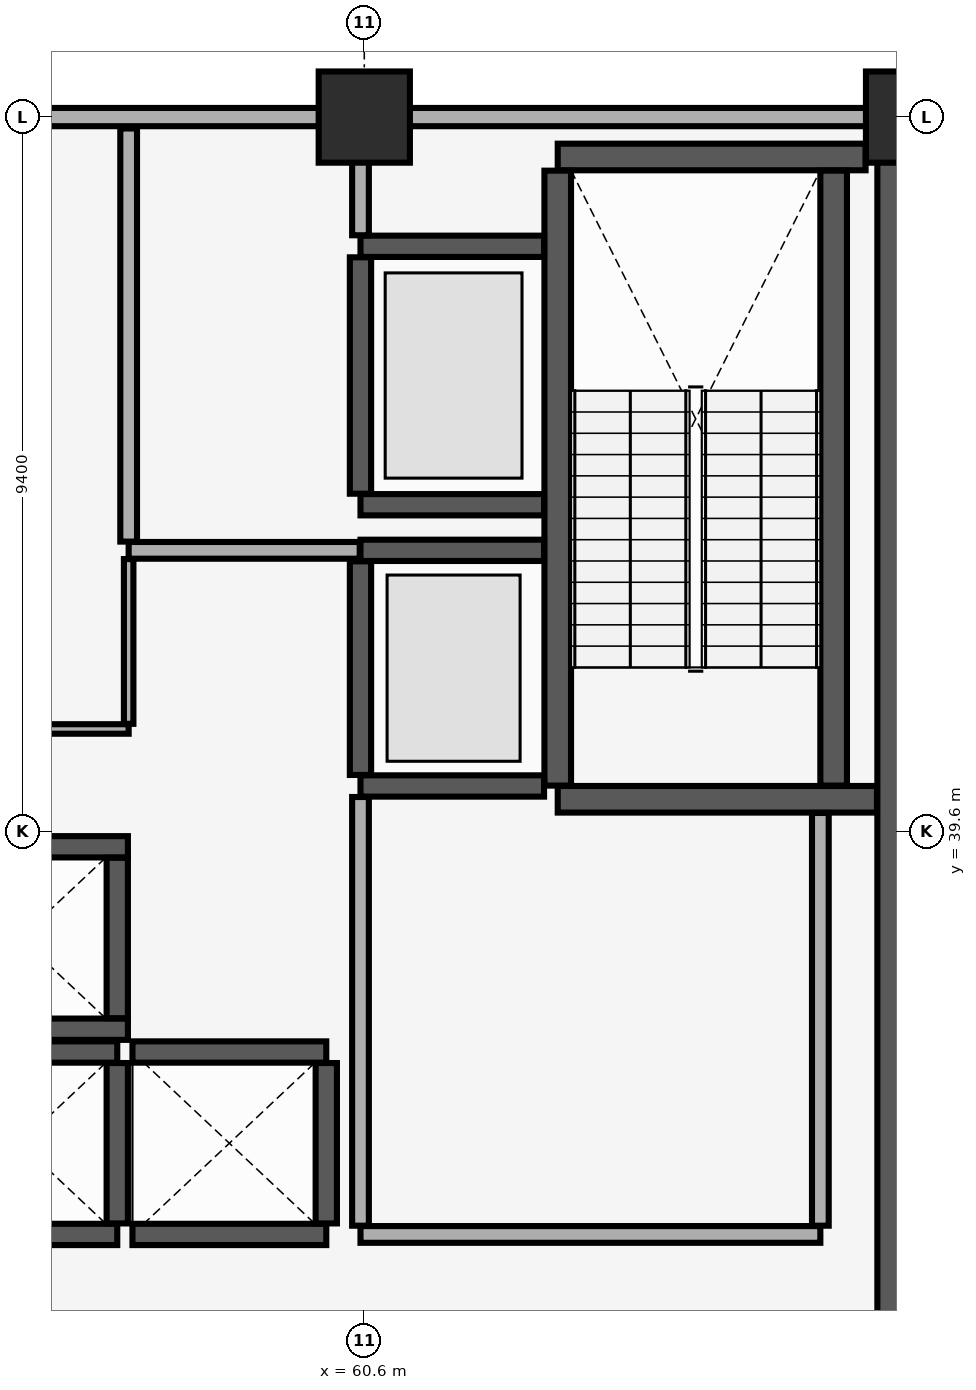
"""IFC4 building model, lengths in metres.
Left out: names, types, materials, properties, quantities, classifications, styles, units other than length and angle.
Written with IfcOpenShell. Run it as: python <this file> out.ifc"""

import sys

from ifc_helpers import new_model, si_unit, direction, frame, frame_2d, origin, origin_2d, place, context, subcontext, project, spatial, rectangle, extrude, element, fill, save


model = new_model("IFC4")
c1 = context("Model", 3, precision=1e-05, world=origin(), true_north=direction((0.0, 1.0)))
c2 = subcontext(c1, "Body", "Model", "MODEL_VIEW")
j1 = project(units=[si_unit("LENGTHUNIT", "METRE"), si_unit("PLANEANGLEUNIT", "RADIAN")], contexts=[c1])
p1 = place(None, origin())
s1 = spatial("IfcSite", under=j1, at=p1, CompositionType="ELEMENT")
p2 = place(p1, origin())
s2 = spatial("IfcBuilding", under=s1, at=p2, CompositionType="ELEMENT")
p3 = place(p2, frame((0.0, 0.0, 224.35)))
s3 = spatial("IfcBuildingStorey", under=s2, at=p3, CompositionType="ELEMENT", Elevation=224.35)
for number, where, z_axis, x_axis in (
    (1, (60.6, 49.0, 0.0), (0.0, 0.0, 1.0), (1.0, 0.0, 0.0)),
    (2, (67.8, 49.0, 0.0), (0.0, 0.0, 1.0), (1.0, 0.0, 0.0)),
):
    element("IfcColumn", number, at=place(p3, frame(where, z_axis=z_axis, x_axis=x_axis)), inside=s3, PredefinedType="COLUMN", context=c2, shape_type="SweptSolid", body=[
        extrude(rectangle(XDim=1.2, YDim=1.2, at=origin_2d()), origin(), (0.0, 0.0, 1.0), 4.56),
    ])
p4 = place(p3, frame((77.0, 49.0, 0.0), z_axis=(0.0, 0.0, 1.0), x_axis=(-1.0, 0.0, 0.0)))
e3 = element("IfcWall", 3, at=p4, inside=s3, PredefinedType="SOLIDWALL", context=c2, shape_type="SweptSolid", body=[
    extrude(rectangle(XDim=70.0, YDim=0.24, at=frame_2d((35.0, 0.0))), origin(), (0.0, 0.0, 1.0), 3.4),
])
p5 = place(p4, frame((62.975, 0.0, 0.85)))
e4 = element("IfcOpeningElement", 4, at=p5, cuts=e3, PredefinedType="OPENING", context=c2, shape_type="SweptSolid", body=[
    extrude(rectangle(XDim=3.0, YDim=1.5, at=frame_2d((1.5, 0.75))), frame((0.0, 0.13, 0.0), z_axis=(0.0, -1.0, 0.0), x_axis=(1.0, 0.0, 0.0)), (0.0, 0.0, 1.0), 0.26),
])
p6 = place(p4, frame((4.025, 0.0, 0.85)))
e5 = element("IfcOpeningElement", 5, at=p6, cuts=e3, PredefinedType="OPENING", context=c2, shape_type="SweptSolid", body=[
    extrude(rectangle(XDim=3.0, YDim=1.5, at=frame_2d((1.5, 0.75))), frame((0.0, 0.13, 0.0), z_axis=(0.0, -1.0, 0.0), x_axis=(1.0, 0.0, 0.0)), (0.0, 0.0, 1.0), 0.26),
])
p7 = place(p4, frame((49.465, 0.0, 0.9)))
e6 = element("IfcOpeningElement", 6, at=p7, cuts=e3, PredefinedType="OPENING", context=c2, shape_type="SweptSolid", body=[
    extrude(rectangle(XDim=1.5, YDim=1.4, at=frame_2d((0.75, 0.7))), frame((0.0, 0.13, 0.0), z_axis=(0.0, -1.0, 0.0), x_axis=(1.0, 0.0, 0.0)), (0.0, 0.0, 1.0), 0.26),
])
p8 = place(p4, frame((41.65, 0.0, 0.9)))
e7 = element("IfcOpeningElement", 7, at=p8, cuts=e3, PredefinedType="OPENING", context=c2, shape_type="SweptSolid", body=[
    extrude(rectangle(XDim=3.6, YDim=1.5, at=frame_2d((1.8, 0.75))), frame((0.0, 0.13, 0.0), z_axis=(0.0, -1.0, 0.0), x_axis=(1.0, 0.0, 0.0)), (0.0, 0.0, 1.0), 0.26),
])
p9 = place(p4, frame((28.25, 0.0, 0.9)))
e8 = element("IfcOpeningElement", 8, at=p9, cuts=e3, PredefinedType="OPENING", context=c2, shape_type="SweptSolid", body=[
    extrude(rectangle(XDim=1.5, YDim=1.4, at=frame_2d((0.75, 0.7))), frame((0.0, 0.13, 0.0), z_axis=(0.0, -1.0, 0.0), x_axis=(1.0, 0.0, 0.0)), (0.0, 0.0, 1.0), 0.26),
])
p10 = place(p4, frame((24.6, 0.0, 0.9)))
e9 = element("IfcOpeningElement", 9, at=p10, cuts=e3, PredefinedType="OPENING", context=c2, shape_type="SweptSolid", body=[
    extrude(rectangle(XDim=2.4, YDim=1.5, at=frame_2d((1.2, 0.75))), frame((0.0, 0.13, 0.0), z_axis=(0.0, -1.0, 0.0), x_axis=(1.0, 0.0, 0.0)), (0.0, 0.0, 1.0), 0.26),
])
p11 = place(p4, frame((20.235, 0.0, 0.9)))
e10 = element("IfcOpeningElement", 10, at=p11, cuts=e3, PredefinedType="OPENING", context=c2, shape_type="SweptSolid", body=[
    extrude(rectangle(XDim=2.4, YDim=1.5, at=frame_2d((1.2, 0.75))), frame((0.0, 0.13, 0.0), z_axis=(0.0, -1.0, 0.0), x_axis=(1.0, 0.0, 0.0)), (0.0, 0.0, 1.0), 0.26),
])
p12 = place(p3, frame((67.8, 29.4, 0.0), z_axis=(0.0, 0.0, 1.0), x_axis=(0.0, 1.0, 0.0)))
e11 = element("IfcWall", 11, at=p12, inside=s3, PredefinedType="SHEAR", context=c2, shape_type="SweptSolid", body=[
    extrude(rectangle(XDim=19.2, YDim=0.9, at=frame_2d((9.6, 0.0))), origin(), (0.0, 0.0, 1.0), 4.52),
])
p13 = place(p3, frame((63.145, 40.025, 0.0), z_axis=(0.0, 0.0, 1.0), x_axis=(1.0, 0.0, 0.0)))
e12 = element("IfcWall", 12, at=p13, inside=s3, PredefinedType="SHEAR", context=c2, shape_type="SweptSolid", body=[
    extrude(rectangle(XDim=4.2, YDim=0.35, at=frame_2d((2.1, 0.0))), origin(), (0.0, 0.0, 1.0), 4.52),
])
p14 = place(p13, frame((1.24, 0.0, 0.0)))
e13 = element("IfcOpeningElement", 13, at=p14, cuts=e12, PredefinedType="OPENING", context=c2, shape_type="SweptSolid", body=[
    extrude(rectangle(XDim=1.15, YDim=2.15, at=frame_2d((0.575, 1.075))), frame((0.0, 0.185, 0.0), z_axis=(0.0, -1.0, 0.0), x_axis=(1.0, 0.0, 0.0)), (0.0, 0.0, 1.0), 0.37),
])
p15 = place(p3, frame((63.145, 48.475, 0.0), z_axis=(0.0, 0.0, 1.0), x_axis=(1.0, 0.0, 0.0)))
e14 = element("IfcWall", 14, at=p15, inside=s3, PredefinedType="SHEAR", context=c2, shape_type="SweptSolid", body=[
    extrude(rectangle(XDim=4.05, YDim=0.35, at=frame_2d((2.025, 0.0))), origin(), (0.0, 0.0, 1.0), 4.52),
])
for number, where, z_axis, x_axis in (
    (15, (63.145, 40.205, 0.0), (0.0, 0.0, 1.0), (0.0, 1.0, 0.0)),
    (16, (66.775, 40.205, 0.0), (0.0, 0.0, 1.0), (0.0, 1.0, 0.0)),
):
    element("IfcWall", number, at=place(p3, frame(where, z_axis=z_axis, x_axis=x_axis)), inside=s3, PredefinedType="SHEAR", context=c2, shape_type="SweptSolid", body=[
        extrude(rectangle(XDim=8.09, YDim=0.35, at=frame_2d((4.045, 0.0))), origin(), (0.0, 0.0, 1.0), 4.52),
    ])
for number, where, z_axis, x_axis in (
    (17, (54.8, 34.3, 0.0), (0.0, 0.0, 1.0), (1.0, 0.0, 0.0)),
    (18, (54.8, 36.7, 0.0), (0.0, 0.0, 1.0), (1.0, 0.0, 0.0)),
):
    element("IfcWall", number, at=place(p3, frame(where, z_axis=z_axis, x_axis=x_axis)), inside=s3, PredefinedType="SHEAR", context=c2, shape_type="SweptSolid", body=[
        extrude(rectangle(XDim=2.55, YDim=0.28, at=frame_2d((1.275, 0.0))), origin(), (0.0, 0.0, 1.0), 4.52),
    ])
p16 = place(p3, frame((57.35, 34.445, 0.0), z_axis=(0.0, 0.0, 1.0), x_axis=(0.0, 1.0, 0.0)))
e19 = element("IfcWall", 19, at=p16, inside=s3, PredefinedType="SHEAR", context=c2, shape_type="SweptSolid", body=[
    extrude(rectangle(XDim=2.11, YDim=0.28, at=frame_2d((1.055, 0.0))), origin(), (0.0, 0.0, 1.0), 4.52),
])
for number, where, z_axis, x_axis in (
    (20, (57.55, 34.3, 0.0), (0.0, 0.0, 1.0), (1.0, 0.0, 0.0)),
    (21, (57.55, 36.7, 0.0), (0.0, 0.0, 1.0), (1.0, 0.0, 0.0)),
):
    element("IfcWall", number, at=place(p3, frame(where, z_axis=z_axis, x_axis=x_axis)), inside=s3, PredefinedType="SHEAR", context=c2, shape_type="SweptSolid", body=[
        extrude(rectangle(XDim=2.55, YDim=0.28, at=frame_2d((1.275, 0.0))), origin(), (0.0, 0.0, 1.0), 4.52),
    ])
p17 = place(p3, frame((60.1, 34.445, 0.0), z_axis=(0.0, 0.0, 1.0), x_axis=(0.0, 1.0, 0.0)))
e22 = element("IfcWall", 22, at=p17, inside=s3, PredefinedType="SHEAR", context=c2, shape_type="SweptSolid", body=[
    extrude(rectangle(XDim=2.11, YDim=0.28, at=frame_2d((1.055, 0.0))), origin(), (0.0, 0.0, 1.0), 4.52),
])
for number, where, z_axis, x_axis in (
    (23, (54.66, 37.0, 0.0), (0.0, 0.0, 1.0), (1.0, 0.0, 0.0)),
    (24, (54.66, 39.4, 0.0), (0.0, 0.0, 1.0), (1.0, 0.0, 0.0)),
):
    element("IfcWall", number, at=place(p3, frame(where, z_axis=z_axis, x_axis=x_axis)), inside=s3, PredefinedType="SHEAR", context=c2, shape_type="SweptSolid", body=[
        extrude(rectangle(XDim=2.83, YDim=0.28, at=frame_2d((1.415, 0.0))), origin(), (0.0, 0.0, 1.0), 4.52),
    ])
p18 = place(p3, frame((57.35, 37.145, 0.0), z_axis=(0.0, 0.0, 1.0), x_axis=(0.0, 1.0, 0.0)))
e25 = element("IfcWall", 25, at=p18, inside=s3, PredefinedType="SHEAR", context=c2, shape_type="SweptSolid", body=[
    extrude(rectangle(XDim=2.11, YDim=0.28, at=frame_2d((1.055, 0.0))), origin(), (0.0, 0.0, 1.0), 4.52),
])
p19 = place(p3, frame((60.55, 40.2, 0.0), z_axis=(0.0, 0.0, 1.0), x_axis=(1.0, 0.0, 0.0)))
e26 = element("IfcWall", 26, at=p19, inside=s3, PredefinedType="SHEAR", context=c2, shape_type="SweptSolid", body=[
    extrude(rectangle(XDim=2.415, YDim=0.28, at=frame_2d((1.208, 0.0))), origin(), (0.0, 0.0, 1.0), 4.52),
])
p20 = place(p19, frame((0.575, 0.0, 0.0)))
e27 = element("IfcOpeningElement", 27, at=p20, cuts=e26, PredefinedType="OPENING", context=c2, shape_type="SweptSolid", body=[
    extrude(rectangle(XDim=1.3, YDim=2.3, at=frame_2d((0.65, 1.15))), frame((0.0, 0.15, 0.0), z_axis=(0.0, -1.0, 0.0), x_axis=(1.0, 0.0, 0.0)), (0.0, 0.0, 1.0), 0.3),
])
p21 = place(p3, frame((60.55, 43.3, 0.0), z_axis=(0.0, 0.0, 1.0), x_axis=(1.0, 0.0, 0.0)))
e28 = element("IfcWall", 28, at=p21, inside=s3, PredefinedType="SHEAR", context=c2, shape_type="SweptSolid", body=[
    extrude(rectangle(XDim=2.415, YDim=0.28, at=frame_2d((1.208, 0.0))), origin(), (0.0, 0.0, 1.0), 4.52),
])
p22 = place(p3, frame((60.55, 40.345, 0.0), z_axis=(0.0, 0.0, 1.0), x_axis=(0.0, 1.0, 0.0)))
e29 = element("IfcWall", 29, at=p22, inside=s3, PredefinedType="SHEAR", context=c2, shape_type="SweptSolid", body=[
    extrude(rectangle(XDim=2.81, YDim=0.28, at=frame_2d((1.405, 0.0))), origin(), (0.0, 0.0, 1.0), 4.52),
])
for number, where, z_axis, x_axis in (
    (30, (60.55, 43.9, 0.0), (0.0, 0.0, 1.0), (1.0, 0.0, 0.0)),
    (31, (60.55, 47.3, 0.0), (0.0, 0.0, 1.0), (1.0, 0.0, 0.0)),
):
    element("IfcWall", number, at=place(p3, frame(where, z_axis=z_axis, x_axis=x_axis)), inside=s3, PredefinedType="SHEAR", context=c2, shape_type="SweptSolid", body=[
        extrude(rectangle(XDim=2.415, YDim=0.28, at=frame_2d((1.208, 0.0))), origin(), (0.0, 0.0, 1.0), 4.52),
    ])
p23 = place(p3, frame((60.55, 44.045, 0.0), z_axis=(0.0, 0.0, 1.0), x_axis=(0.0, 1.0, 0.0)))
e32 = element("IfcWall", 32, at=p23, inside=s3, PredefinedType="SHEAR", context=c2, shape_type="SweptSolid", body=[
    extrude(rectangle(XDim=3.11, YDim=0.28, at=frame_2d((1.555, 0.0))), origin(), (0.0, 0.0, 1.0), 4.52),
])
p24 = place(p23, frame((0.905, 0.0, 0.0)))
e33 = element("IfcOpeningElement", 33, at=p24, cuts=e32, PredefinedType="OPENING", context=c2, shape_type="SweptSolid", body=[
    extrude(rectangle(XDim=1.3, YDim=2.3, at=frame_2d((0.65, 1.15))), frame((0.0, 0.15, 0.0), z_axis=(0.0, -1.0, 0.0), x_axis=(1.0, 0.0, 0.0)), (0.0, 0.0, 1.0), 0.3),
])
p25 = place(p3, frame((60.55, 34.3, 0.0), z_axis=(0.0, 0.0, 1.0), x_axis=(1.0, 0.0, 0.0)))
e34 = element("IfcWall", 34, at=p25, inside=s3, PredefinedType="PARTITIONING", context=c2, shape_type="SweptSolid", body=[
    extrude(rectangle(XDim=6.05, YDim=0.22, at=frame_2d((3.025, 0.0))), origin(), (0.0, 0.0, 1.0), 4.52),
])
p26 = place(p25, frame((2.65, 0.0, 0.0)))
e35 = element("IfcOpeningElement", 35, at=p26, cuts=e34, PredefinedType="OPENING", context=c2, shape_type="SweptSolid", body=[
    extrude(rectangle(XDim=1.2, YDim=2.15, at=frame_2d((0.6, 1.075))), frame((0.0, 0.12, 0.0), z_axis=(0.0, -1.0, 0.0), x_axis=(1.0, 0.0, 0.0)), (0.0, 0.0, 1.0), 0.24),
])
p27 = place(p3, frame((60.55, 34.415, 0.0), z_axis=(0.0, 0.0, 1.0), x_axis=(0.0, 1.0, 0.0)))
e36 = element("IfcWall", 36, at=p27, inside=s3, PredefinedType="PARTITIONING", context=c2, shape_type="SweptSolid", body=[
    extrude(rectangle(XDim=5.64, YDim=0.22, at=frame_2d((2.82, 0.0))), origin(), (0.0, 0.0, 1.0), 4.52),
])
p28 = place(p3, frame((66.6, 34.415, 0.0), z_axis=(0.0, 0.0, 1.0), x_axis=(0.0, 1.0, 0.0)))
e37 = element("IfcWall", 37, at=p28, inside=s3, PredefinedType="PARTITIONING", context=c2, shape_type="SweptSolid", body=[
    extrude(rectangle(XDim=5.43, YDim=0.22, at=frame_2d((2.715, 0.0))), origin(), (0.0, 0.0, 1.0), 4.52),
])
p29 = place(p3, frame((57.5, 43.3, 0.0), z_axis=(0.0, 0.0, 1.0), x_axis=(1.0, 0.0, 0.0)))
e38 = element("IfcWall", 38, at=p29, inside=s3, PredefinedType="PARTITIONING", context=c2, shape_type="SweptSolid", body=[
    extrude(rectangle(XDim=3.04, YDim=0.22, at=frame_2d((1.52, 0.0))), origin(), (0.0, 0.0, 1.0), 4.52),
])
p30 = place(p29, frame((0.9, 0.0, 0.0)))
e39 = element("IfcOpeningElement", 39, at=p30, cuts=e38, PredefinedType="OPENING", context=c2, shape_type="SweptSolid", body=[
    extrude(rectangle(XDim=1.2, YDim=2.15, at=frame_2d((0.6, 1.075))), frame((0.0, 0.12, 0.0), z_axis=(0.0, -1.0, 0.0), x_axis=(1.0, 0.0, 0.0)), (0.0, 0.0, 1.0), 0.24),
])
p31 = place(p3, frame((57.5, 43.415, 0.0), z_axis=(0.0, 0.0, 1.0), x_axis=(0.0, 1.0, 0.0)))
e40 = element("IfcWall", 40, at=p31, inside=s3, PredefinedType="PARTITIONING", context=c2, shape_type="SweptSolid", body=[
    extrude(rectangle(XDim=5.435, YDim=0.22, at=frame_2d((2.718, 0.0))), origin(), (0.0, 0.0, 1.0), 4.52),
])
p32 = place(p3, frame((60.55, 47.445, 0.0), z_axis=(0.0, 0.0, 1.0), x_axis=(0.0, 1.0, 0.0)))
e41 = element("IfcWall", 41, at=p32, inside=s3, PredefinedType="PARTITIONING", context=c2, shape_type="SweptSolid", body=[
    extrude(rectangle(XDim=1.405, YDim=0.22, at=frame_2d((0.703, 0.0))), origin(), (0.0, 0.0, 1.0), 4.52),
])
p33 = place(p3, frame((49.468, 40.95, 0.0), z_axis=(0.0, 0.0, 1.0), x_axis=(1.0, 0.0, 0.0)))
e42 = element("IfcWall", 42, at=p33, inside=s3, PredefinedType="PARTITIONING", context=c2, shape_type="SweptSolid", body=[
    extrude(rectangle(XDim=8.032, YDim=0.125, at=frame_2d((4.016, 0.0))), origin(), (0.0, 0.0, 1.0), 4.52),
])
p34 = place(p33, frame((4.782, 0.0, 0.0)))
e43 = element("IfcOpeningElement", 43, at=p34, cuts=e42, PredefinedType="OPENING", context=c2, shape_type="SweptSolid", body=[
    extrude(rectangle(XDim=0.9, YDim=2.1, at=frame_2d((0.45, 1.05))), frame((0.0, 0.073, 0.0), z_axis=(0.0, -1.0, 0.0), x_axis=(1.0, 0.0, 0.0)), (0.0, 0.0, 1.0), 0.145),
])
p35 = place(p3, frame((57.5, 41.018, 0.0), z_axis=(0.0, 0.0, 1.0), x_axis=(0.0, 1.0, 0.0)))
e44 = element("IfcWall", 44, at=p35, inside=s3, PredefinedType="PARTITIONING", context=c2, shape_type="SweptSolid", body=[
    extrude(rectangle(XDim=2.167, YDim=0.125, at=frame_2d((1.084, 0.0))), origin(), (0.0, 0.0, 1.0), 4.52),
])
p36 = place(p11, origin())
e45 = element("IfcWindow", 45, at=p36, inside=s3, PartitioningType="SINGLE_PANEL", PredefinedType="WINDOW", context=c2, shape_type="SweptSolid", body=[
    extrude(rectangle(XDim=2.4, YDim=1.5, at=frame_2d((1.2, 0.75))), frame((0.0, 0.03, 0.0), z_axis=(0.0, -1.0, 0.0), x_axis=(1.0, 0.0, 0.0)), (0.0, 0.0, 1.0), 0.06),
])
fill(e10, e45)
p37 = place(p14, origin())
e46 = element("IfcDoor", 46, at=p37, inside=s3, OperationType="SINGLE_SWING_RIGHT", PredefinedType="DOOR", context=c2, shape_type="SweptSolid", body=[
    extrude(rectangle(XDim=1.15, YDim=2.15, at=frame_2d((0.575, 1.075))), frame((0.0, 0.025, 0.0), z_axis=(0.0, -1.0, 0.0), x_axis=(1.0, 0.0, 0.0)), (0.0, 0.0, 1.0), 0.05),
])
fill(e13, e46)
p38 = place(p20, origin())
e47 = element("IfcDoor", 47, at=p38, inside=s3, OperationType="DOUBLE_DOOR_SLIDING", PredefinedType="DOOR", context=c2, shape_type="SweptSolid", body=[
    extrude(rectangle(XDim=1.3, YDim=2.3, at=frame_2d((0.65, 1.15))), frame((0.0, 0.025, 0.0), z_axis=(0.0, -1.0, 0.0), x_axis=(1.0, 0.0, 0.0)), (0.0, 0.0, 1.0), 0.05),
])
fill(e27, e47)
p39 = place(p24, origin())
e48 = element("IfcDoor", 48, at=p39, inside=s3, OperationType="DOUBLE_DOOR_SLIDING", PredefinedType="DOOR", context=c2, shape_type="SweptSolid", body=[
    extrude(rectangle(XDim=1.3, YDim=2.3, at=frame_2d((0.65, 1.15))), frame((0.0, 0.025, 0.0), z_axis=(0.0, -1.0, 0.0), x_axis=(1.0, 0.0, 0.0)), (0.0, 0.0, 1.0), 0.05),
])
fill(e33, e48)
p40 = place(p26, origin())
e49 = element("IfcDoor", 49, at=p40, inside=s3, OperationType="SINGLE_SWING_RIGHT", PredefinedType="DOOR", context=c2, shape_type="SweptSolid", body=[
    extrude(rectangle(XDim=1.2, YDim=2.15, at=frame_2d((0.6, 1.075))), frame((0.0, 0.025, 0.0), z_axis=(0.0, -1.0, 0.0), x_axis=(1.0, 0.0, 0.0)), (0.0, 0.0, 1.0), 0.05),
])
fill(e35, e49)
p41 = place(p30, origin())
e50 = element("IfcDoor", 50, at=p41, inside=s3, OperationType="SINGLE_SWING_RIGHT", PredefinedType="DOOR", context=c2, shape_type="SweptSolid", body=[
    extrude(rectangle(XDim=1.2, YDim=2.15, at=frame_2d((0.6, 1.075))), frame((0.0, 0.025, 0.0), z_axis=(0.0, -1.0, 0.0), x_axis=(1.0, 0.0, 0.0)), (0.0, 0.0, 1.0), 0.05),
])
fill(e39, e50)
save(model, sys.argv[1])
